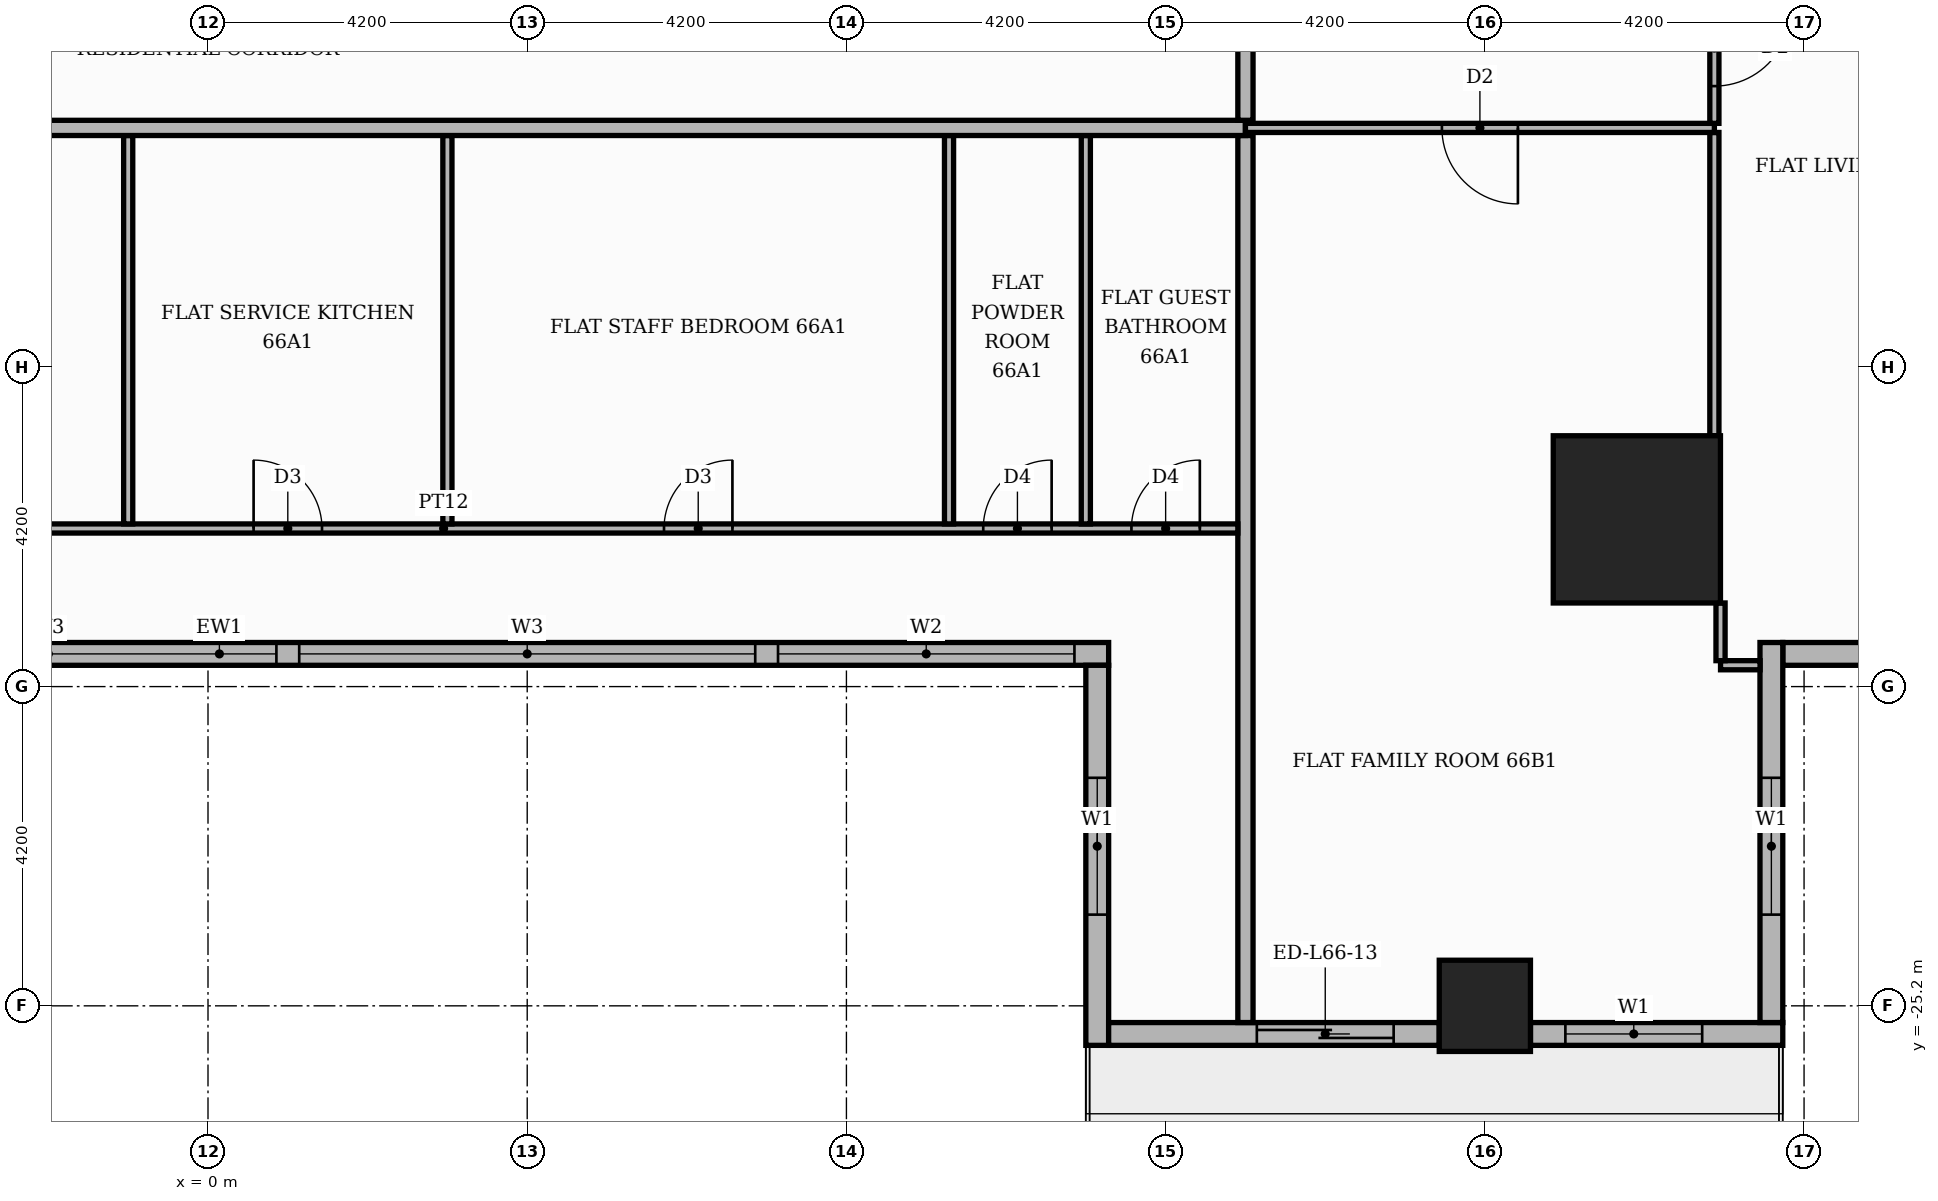
"""IFC4 building model, lengths in metres.
Left out: names, types, materials, properties, quantities, classifications, styles, units other than length and angle.
Written with IfcOpenShell. Run it as: python <this file> out.ifc"""

import sys

from ifc_helpers import new_model, si_unit, direction, frame, frame_2d, origin, origin_2d, place, context, subcontext, project, spatial, rectangle, extrude, element, fill, save


model = new_model("IFC4")
c1 = context("Model", 3, precision=1e-05, world=origin(), true_north=direction((0.0, 1.0)))
c2 = subcontext(c1, "Body", "Model", "MODEL_VIEW")
j1 = project(units=[si_unit("LENGTHUNIT", "METRE"), si_unit("PLANEANGLEUNIT", "RADIAN")], contexts=[c1])
p1 = place(None, origin())
s1 = spatial("IfcSite", under=j1, at=p1, CompositionType="ELEMENT")
p2 = place(p1, origin())
s2 = spatial("IfcBuilding", under=s1, at=p2, CompositionType="ELEMENT")
p3 = place(p2, frame((0.0, 0.0, 275.7)))
s3 = spatial("IfcBuildingStorey", under=s2, at=p3, CompositionType="ELEMENT", Elevation=275.7)
p4 = place(p3, frame((18.8, -18.8, 0.0), z_axis=(0.0, 0.0, 1.0), x_axis=(1.0, 0.0, 0.0)))
e1 = element("IfcColumn", 1, at=p4, inside=s3, PredefinedType="COLUMN", context=c2, shape_type="SweptSolid", body=[
    extrude(rectangle(XDim=2.2, YDim=2.2, at=origin_2d()), origin(), (0.0, 0.0, 1.0), 3.9),
])
p5 = place(p3, frame((16.8, -25.2, 0.0), z_axis=(0.0, 0.0, 1.0), x_axis=(1.0, 0.0, 0.0)))
e2 = element("IfcColumn", 2, at=p5, inside=s3, PredefinedType="COLUMN", context=c2, shape_type="SweptSolid", body=[
    extrude(rectangle(XDim=1.2, YDim=1.2, at=origin_2d()), origin(), (0.0, 0.0, 1.0), 3.9),
])
p6 = place(p3, frame((20.72, -20.57, 0.0), z_axis=(0.0, 0.0, 1.0), x_axis=(1.0, 0.0, 0.0)))
e3 = element("IfcWall", 3, at=p6, inside=s3, PredefinedType="STANDARD", context=c2, shape_type="SweptSolid", body=[
    extrude(rectangle(XDim=5.0, YDim=0.3, at=frame_2d((2.5, 0.0))), origin(), (0.0, 0.0, 1.0), 3.48),
])
p7 = place(p6, frame((1.48, 0.0, 0.9)))
e4 = element("IfcOpeningElement", 4, at=p7, cuts=e3, PredefinedType="OPENING", context=c2, shape_type="SweptSolid", body=[
    extrude(rectangle(XDim=1.8, YDim=2.1, at=frame_2d((0.9, 1.05))), frame((0.0, 0.16, 0.0), z_axis=(0.0, -1.0, 0.0), x_axis=(1.0, 0.0, 0.0)), (0.0, 0.0, 1.0), 0.32),
])
p8 = place(p3, frame((-11.55, -20.57, 0.0), z_axis=(0.0, 0.0, 1.0), x_axis=(1.0, 0.0, 0.0)))
e5 = element("IfcWall", 5, at=p8, inside=s3, PredefinedType="STANDARD", context=c2, shape_type="SweptSolid", body=[
    extrude(rectangle(XDim=23.4, YDim=0.3, at=frame_2d((11.7, 0.0))), origin(), (0.0, 0.0, 1.0), 3.48),
])
p9 = place(p8, frame((0.15, 0.0, 0.9)))
e6 = element("IfcOpeningElement", 6, at=p9, cuts=e5, PredefinedType="OPENING", context=c2, shape_type="SweptSolid", body=[
    extrude(rectangle(XDim=6.0, YDim=2.1, at=frame_2d((3.0, 1.05))), frame((0.0, 0.16, 0.0), z_axis=(0.0, -1.0, 0.0), x_axis=(1.0, 0.0, 0.0)), (0.0, 0.0, 1.0), 0.32),
])
p10 = place(p8, frame((6.45, 0.0, 0.9)))
e7 = element("IfcOpeningElement", 7, at=p10, cuts=e5, PredefinedType="OPENING", context=c2, shape_type="SweptSolid", body=[
    extrude(rectangle(XDim=6.0, YDim=2.1, at=frame_2d((3.0, 1.05))), frame((0.0, 0.16, 0.0), z_axis=(0.0, -1.0, 0.0), x_axis=(1.0, 0.0, 0.0)), (0.0, 0.0, 1.0), 0.32),
])
p11 = place(p8, frame((12.75, 0.0, 0.9)))
e8 = element("IfcOpeningElement", 8, at=p11, cuts=e5, PredefinedType="OPENING", context=c2, shape_type="SweptSolid", body=[
    extrude(rectangle(XDim=6.0, YDim=2.1, at=frame_2d((3.0, 1.05))), frame((0.0, 0.16, 0.0), z_axis=(0.0, -1.0, 0.0), x_axis=(1.0, 0.0, 0.0)), (0.0, 0.0, 1.0), 0.32),
])
p12 = place(p8, frame((19.05, 0.0, 0.9)))
e9 = element("IfcOpeningElement", 9, at=p12, cuts=e5, PredefinedType="OPENING", context=c2, shape_type="SweptSolid", body=[
    extrude(rectangle(XDim=3.9, YDim=2.1, at=frame_2d((1.95, 1.05))), frame((0.0, 0.16, 0.0), z_axis=(0.0, -1.0, 0.0), x_axis=(1.0, 0.0, 0.0)), (0.0, 0.0, 1.0), 0.32),
])
p13 = place(p3, frame((11.7, -20.72, 0.0), z_axis=(0.0, 0.0, 1.0), x_axis=(0.0, -1.0, 0.0)))
e10 = element("IfcWall", 10, at=p13, inside=s3, PredefinedType="STANDARD", context=c2, shape_type="SweptSolid", body=[
    extrude(rectangle(XDim=5.0, YDim=0.3, at=frame_2d((2.5, 0.0))), origin(), (0.0, 0.0, 1.0), 3.48),
])
p14 = place(p13, frame((1.48, 0.0, 0.9)))
e11 = element("IfcOpeningElement", 11, at=p14, cuts=e10, PredefinedType="OPENING", context=c2, shape_type="SweptSolid", body=[
    extrude(rectangle(XDim=1.8, YDim=2.1, at=frame_2d((0.9, 1.05))), frame((0.0, 0.16, 0.0), z_axis=(0.0, -1.0, 0.0), x_axis=(1.0, 0.0, 0.0)), (0.0, 0.0, 1.0), 0.32),
])
p15 = place(p3, frame((11.85, -25.57, 0.0), z_axis=(0.0, 0.0, 1.0), x_axis=(1.0, 0.0, 0.0)))
e12 = element("IfcWall", 12, at=p15, inside=s3, PredefinedType="STANDARD", context=c2, shape_type="SweptSolid", body=[
    extrude(rectangle(XDim=4.35, YDim=0.3, at=frame_2d((2.175, 0.0))), origin(), (0.0, 0.0, 1.0), 3.48),
])
p16 = place(p15, frame((1.95, 0.0, 0.0)))
e13 = element("IfcOpeningElement", 13, at=p16, cuts=e12, PredefinedType="OPENING", context=c2, shape_type="SweptSolid", body=[
    extrude(rectangle(XDim=1.8, YDim=2.4, at=frame_2d((0.9, 1.2))), frame((0.0, 0.16, 0.0), z_axis=(0.0, -1.0, 0.0), x_axis=(1.0, 0.0, 0.0)), (0.0, 0.0, 1.0), 0.32),
])
p17 = place(p3, frame((17.4, -25.57, 0.0), z_axis=(0.0, 0.0, 1.0), x_axis=(1.0, 0.0, 0.0)))
e14 = element("IfcWall", 14, at=p17, inside=s3, PredefinedType="STANDARD", context=c2, shape_type="SweptSolid", body=[
    extrude(rectangle(XDim=3.32, YDim=0.3, at=frame_2d((1.66, 0.0))), origin(), (0.0, 0.0, 1.0), 3.48),
])
p18 = place(p17, frame((0.459, 0.0, 0.9)))
e15 = element("IfcOpeningElement", 15, at=p18, cuts=e14, PredefinedType="OPENING", context=c2, shape_type="SweptSolid", body=[
    extrude(rectangle(XDim=1.8, YDim=2.1, at=frame_2d((0.9, 1.05))), frame((0.0, 0.16, 0.0), z_axis=(0.0, -1.0, 0.0), x_axis=(1.0, 0.0, 0.0)), (0.0, 0.0, 1.0), 0.32),
])
p19 = place(p3, frame((20.57, -25.42, 0.0), z_axis=(0.0, 0.0, 1.0), x_axis=(0.0, 1.0, 0.0)))
e16 = element("IfcWall", 16, at=p19, inside=s3, PredefinedType="STANDARD", context=c2, shape_type="SweptSolid", body=[
    extrude(rectangle(XDim=5.0, YDim=0.3, at=frame_2d((2.5, 0.0))), origin(), (0.0, 0.0, 1.0), 3.48),
])
p20 = place(p19, frame((1.42, 0.0, 0.9)))
e17 = element("IfcOpeningElement", 17, at=p20, cuts=e16, PredefinedType="OPENING", context=c2, shape_type="SweptSolid", body=[
    extrude(rectangle(XDim=1.8, YDim=2.1, at=frame_2d((0.9, 1.05))), frame((0.0, 0.16, 0.0), z_axis=(0.0, -1.0, 0.0), x_axis=(1.0, 0.0, 0.0)), (0.0, 0.0, 1.0), 0.32),
])
p21 = place(p3, frame((13.65, -25.42, 0.0), z_axis=(0.0, 0.0, 1.0), x_axis=(0.0, 1.0, 0.0)))
e18 = element("IfcWall", 18, at=p21, inside=s3, PredefinedType="PARTITIONING", context=c2, shape_type="SweptSolid", body=[
    extrude(rectangle(XDim=11.67, YDim=0.2, at=frame_2d((5.835, 0.0))), origin(), (0.0, 0.0, 1.0), 3.48),
])
p22 = place(p3, frame((19.901, -20.719, 0.0), z_axis=(0.0, 0.0, 1.0), x_axis=(1.0, 0.0, 0.0)))
e19 = element("IfcWall", 19, at=p22, inside=s3, PredefinedType="PARTITIONING", context=c2, shape_type="SweptSolid", body=[
    extrude(rectangle(XDim=0.52, YDim=0.12, at=frame_2d((0.26, 0.0))), origin(), (0.0, 0.0, 1.0), 3.48),
])
p23 = place(p3, frame((19.901, -20.659, 0.0), z_axis=(0.0, 0.0, 1.0), x_axis=(0.0, 1.0, 0.0)))
e20 = element("IfcWall", 20, at=p23, inside=s3, PredefinedType="PARTITIONING", context=c2, shape_type="SweptSolid", body=[
    extrude(rectangle(XDim=0.759, YDim=0.12, at=frame_2d((0.379, 0.0))), origin(), (0.0, 0.0, 1.0), 3.48),
])
p24 = place(p3, frame((-7.35, -18.92, 0.0), z_axis=(0.0, 0.0, 1.0), x_axis=(1.0, 0.0, 0.0)))
e21 = element("IfcWall", 21, at=p24, inside=s3, PredefinedType="PARTITIONING", context=c2, shape_type="SweptSolid", body=[
    extrude(rectangle(XDim=20.9, YDim=0.12, at=frame_2d((10.45, 0.0))), origin(), (0.0, 0.0, 1.0), 3.48),
])
p25 = place(p24, frame((2.7, 0.0, 0.0)))
e22 = element("IfcOpeningElement", 22, at=p25, cuts=e21, PredefinedType="OPENING", context=c2, shape_type="SweptSolid", body=[
    extrude(rectangle(XDim=0.9, YDim=2.1, at=frame_2d((0.45, 1.05))), frame((0.0, 0.07, 0.0), z_axis=(0.0, -1.0, 0.0), x_axis=(1.0, 0.0, 0.0)), (0.0, 0.0, 1.0), 0.14),
])
p26 = place(p24, frame((7.95, 0.0, 0.0)))
e23 = element("IfcOpeningElement", 23, at=p26, cuts=e21, PredefinedType="OPENING", context=c2, shape_type="SweptSolid", body=[
    extrude(rectangle(XDim=0.9, YDim=2.1, at=frame_2d((0.45, 1.05))), frame((0.0, 0.07, 0.0), z_axis=(0.0, -1.0, 0.0), x_axis=(1.0, 0.0, 0.0)), (0.0, 0.0, 1.0), 0.14),
])
p27 = place(p24, frame((13.35, 0.0, 0.0)))
e24 = element("IfcOpeningElement", 24, at=p27, cuts=e21, PredefinedType="OPENING", context=c2, shape_type="SweptSolid", body=[
    extrude(rectangle(XDim=0.9, YDim=2.1, at=frame_2d((0.45, 1.05))), frame((0.0, 0.07, 0.0), z_axis=(0.0, -1.0, 0.0), x_axis=(1.0, 0.0, 0.0)), (0.0, 0.0, 1.0), 0.14),
])
p28 = place(p24, frame((17.55, 0.0, 0.0)))
e25 = element("IfcOpeningElement", 25, at=p28, cuts=e21, PredefinedType="OPENING", context=c2, shape_type="SweptSolid", body=[
    extrude(rectangle(XDim=0.9, YDim=2.1, at=frame_2d((0.45, 1.05))), frame((0.0, 0.07, 0.0), z_axis=(0.0, -1.0, 0.0), x_axis=(1.0, 0.0, 0.0)), (0.0, 0.0, 1.0), 0.14),
])
p29 = place(p24, frame((19.5, 0.0, 0.0)))
e26 = element("IfcOpeningElement", 26, at=p29, cuts=e21, PredefinedType="OPENING", context=c2, shape_type="SweptSolid", body=[
    extrude(rectangle(XDim=0.9, YDim=2.1, at=frame_2d((0.45, 1.05))), frame((0.0, 0.07, 0.0), z_axis=(0.0, -1.0, 0.0), x_axis=(1.0, 0.0, 0.0)), (0.0, 0.0, 1.0), 0.14),
])
for number, where, z_axis, x_axis in (
    (27, (-1.05, -18.86, 0.0), (0.0, 0.0, 1.0), (0.0, 1.0, 0.0)),
    (28, (3.15, -18.86, 0.0), (0.0, 0.0, 1.0), (0.0, 1.0, 0.0)),
    (29, (9.75, -18.86, 0.0), (0.0, 0.0, 1.0), (0.0, 1.0, 0.0)),
    (30, (11.55, -18.86, 0.0), (0.0, 0.0, 1.0), (0.0, 1.0, 0.0)),
):
    element("IfcWall", number, at=place(p3, frame(where, z_axis=z_axis, x_axis=x_axis)), inside=s3, PredefinedType="PARTITIONING", context=c2, shape_type="SweptSolid", body=[
        extrude(rectangle(XDim=5.11, YDim=0.12, at=frame_2d((2.555, 0.0))), origin(), (0.0, 0.0, 1.0), 3.48),
    ])
p30 = place(p3, frame((19.82, -17.7, 0.0), z_axis=(0.0, 0.0, 1.0), x_axis=(0.0, 1.0, 0.0)))
e31 = element("IfcWall", 31, at=p30, inside=s3, PredefinedType="PARTITIONING", context=c2, shape_type="SweptSolid", body=[
    extrude(rectangle(XDim=3.99, YDim=0.12, at=frame_2d((1.995, 0.0))), origin(), (0.0, 0.0, 1.0), 3.48),
])
p31 = place(p3, frame((-25.42, -13.65, 0.0), z_axis=(0.0, 0.0, 1.0), x_axis=(1.0, 0.0, 0.0)))
e32 = element("IfcWall", 32, at=p31, inside=s3, PredefinedType="PARTITIONING", context=c2, shape_type="SweptSolid", body=[
    extrude(rectangle(XDim=39.07, YDim=0.2, at=frame_2d((19.535, 0.0))), origin(), (0.0, 0.0, 1.0), 3.48),
])
p32 = place(p31, frame((14.37, 0.0, 0.0)))
e33 = element("IfcOpeningElement", 33, at=p32, cuts=e32, PredefinedType="OPENING", context=c2, shape_type="SweptSolid", body=[
    extrude(rectangle(XDim=1.1, YDim=2.4, at=frame_2d((0.55, 1.2))), frame((0.0, 0.11, 0.0), z_axis=(0.0, -1.0, 0.0), x_axis=(1.0, 0.0, 0.0)), (0.0, 0.0, 1.0), 0.22),
])
p33 = place(p3, frame((13.65, -13.65, 0.0), z_axis=(0.0, 0.0, 1.0), x_axis=(1.0, 0.0, 0.0)))
e34 = element("IfcWall", 34, at=p33, inside=s3, PredefinedType="PARTITIONING", context=c2, shape_type="SweptSolid", body=[
    extrude(rectangle(XDim=6.17, YDim=0.12, at=frame_2d((3.085, 0.0))), origin(), (0.0, 0.0, 1.0), 3.48),
])
p34 = place(p33, frame((2.585, 0.0, 0.0)))
e35 = element("IfcOpeningElement", 35, at=p34, cuts=e34, PredefinedType="OPENING", context=c2, shape_type="SweptSolid", body=[
    extrude(rectangle(XDim=1.0, YDim=2.1, at=frame_2d((0.5, 1.05))), frame((0.0, 0.07, 0.0), z_axis=(0.0, -1.0, 0.0), x_axis=(1.0, 0.0, 0.0)), (0.0, 0.0, 1.0), 0.14),
])
p35 = place(p3, frame((19.82, -13.59, 0.0), z_axis=(0.0, 0.0, 1.0), x_axis=(0.0, 1.0, 0.0)))
e36 = element("IfcWall", 36, at=p35, inside=s3, PredefinedType="PARTITIONING", context=c2, shape_type="SweptSolid", body=[
    extrude(rectangle(XDim=1.98, YDim=0.12, at=frame_2d((0.99, 0.0))), origin(), (0.0, 0.0, 1.0), 3.48),
])
p36 = place(p35, frame((0.49, 0.0, 0.0)))
e37 = element("IfcOpeningElement", 37, at=p36, cuts=e36, PredefinedType="OPENING", context=c2, shape_type="SweptSolid", body=[
    extrude(rectangle(XDim=1.0, YDim=2.1, at=frame_2d((0.5, 1.05))), frame((0.0, 0.07, 0.0), z_axis=(0.0, -1.0, 0.0), x_axis=(1.0, 0.0, 0.0)), (0.0, 0.0, 1.0), 0.14),
])
p37 = place(p3, frame((13.65, -13.55, 0.0), z_axis=(0.0, 0.0, 1.0), x_axis=(0.0, 1.0, 0.0)))
e38 = element("IfcWall", 38, at=p37, inside=s3, PredefinedType="PARTITIONING", context=c2, shape_type="SweptSolid", body=[
    extrude(rectangle(XDim=2.45, YDim=0.2, at=frame_2d((1.225, 0.0))), origin(), (0.0, 0.0, 1.0), 3.48),
])
p38 = place(p10, origin())
e39 = element("IfcWindow", 39, at=p38, inside=s3, PartitioningType="SINGLE_PANEL", PredefinedType="WINDOW", context=c2, shape_type="SweptSolid", body=[
    extrude(rectangle(XDim=6.0, YDim=2.1, at=frame_2d((3.0, 1.05))), frame((0.0, 0.03, 0.0), z_axis=(0.0, -1.0, 0.0), x_axis=(1.0, 0.0, 0.0)), (0.0, 0.0, 1.0), 0.06),
])
fill(e7, e39)
p39 = place(p11, origin())
e40 = element("IfcWindow", 40, at=p39, inside=s3, PartitioningType="SINGLE_PANEL", PredefinedType="WINDOW", context=c2, shape_type="SweptSolid", body=[
    extrude(rectangle(XDim=6.0, YDim=2.1, at=frame_2d((3.0, 1.05))), frame((0.0, 0.03, 0.0), z_axis=(0.0, -1.0, 0.0), x_axis=(1.0, 0.0, 0.0)), (0.0, 0.0, 1.0), 0.06),
])
fill(e8, e40)
p40 = place(p12, origin())
e41 = element("IfcWindow", 41, at=p40, inside=s3, PartitioningType="SINGLE_PANEL", PredefinedType="WINDOW", context=c2, shape_type="SweptSolid", body=[
    extrude(rectangle(XDim=3.9, YDim=2.1, at=frame_2d((1.95, 1.05))), frame((0.0, 0.03, 0.0), z_axis=(0.0, -1.0, 0.0), x_axis=(1.0, 0.0, 0.0)), (0.0, 0.0, 1.0), 0.06),
])
fill(e9, e41)
p41 = place(p14, origin())
e42 = element("IfcWindow", 42, at=p41, inside=s3, PartitioningType="SINGLE_PANEL", PredefinedType="WINDOW", context=c2, shape_type="SweptSolid", body=[
    extrude(rectangle(XDim=1.8, YDim=2.1, at=frame_2d((0.9, 1.05))), frame((0.0, 0.03, 0.0), z_axis=(0.0, -1.0, 0.0), x_axis=(1.0, 0.0, 0.0)), (0.0, 0.0, 1.0), 0.06),
])
fill(e11, e42)
p42 = place(p16, origin())
e43 = element("IfcDoor", 43, at=p42, inside=s3, OperationType="SLIDING_TO_RIGHT", PredefinedType="DOOR", context=c2, shape_type="SweptSolid", body=[
    extrude(rectangle(XDim=1.8, YDim=2.4, at=frame_2d((0.9, 1.2))), frame((0.0, 0.025, 0.0), z_axis=(0.0, -1.0, 0.0), x_axis=(1.0, 0.0, 0.0)), (0.0, 0.0, 1.0), 0.05),
])
fill(e13, e43)
p43 = place(p18, origin())
e44 = element("IfcWindow", 44, at=p43, inside=s3, PartitioningType="SINGLE_PANEL", PredefinedType="WINDOW", context=c2, shape_type="SweptSolid", body=[
    extrude(rectangle(XDim=1.8, YDim=2.1, at=frame_2d((0.9, 1.05))), frame((0.0, 0.03, 0.0), z_axis=(0.0, -1.0, 0.0), x_axis=(1.0, 0.0, 0.0)), (0.0, 0.0, 1.0), 0.06),
])
fill(e15, e44)
p44 = place(p20, origin())
e45 = element("IfcWindow", 45, at=p44, inside=s3, PartitioningType="SINGLE_PANEL", PredefinedType="WINDOW", context=c2, shape_type="SweptSolid", body=[
    extrude(rectangle(XDim=1.8, YDim=2.1, at=frame_2d((0.9, 1.05))), frame((0.0, 0.03, 0.0), z_axis=(0.0, -1.0, 0.0), x_axis=(1.0, 0.0, 0.0)), (0.0, 0.0, 1.0), 0.06),
])
fill(e17, e45)
p45 = place(p26, origin())
e46 = element("IfcDoor", 46, at=p45, inside=s3, OperationType="SINGLE_SWING_LEFT", PredefinedType="DOOR", context=c2, shape_type="SweptSolid", body=[
    extrude(rectangle(XDim=0.9, YDim=2.1, at=frame_2d((0.45, 1.05))), frame((0.0, 0.025, 0.0), z_axis=(0.0, -1.0, 0.0), x_axis=(1.0, 0.0, 0.0)), (0.0, 0.0, 1.0), 0.05),
])
fill(e23, e46)
p46 = place(p27, origin())
e47 = element("IfcDoor", 47, at=p46, inside=s3, OperationType="SINGLE_SWING_RIGHT", PredefinedType="DOOR", context=c2, shape_type="SweptSolid", body=[
    extrude(rectangle(XDim=0.9, YDim=2.1, at=frame_2d((0.45, 1.05))), frame((0.0, 0.025, 0.0), z_axis=(0.0, -1.0, 0.0), x_axis=(1.0, 0.0, 0.0)), (0.0, 0.0, 1.0), 0.05),
])
fill(e24, e47)
p47 = place(p28, origin())
e48 = element("IfcDoor", 48, at=p47, inside=s3, OperationType="SINGLE_SWING_RIGHT", PredefinedType="DOOR", context=c2, shape_type="SweptSolid", body=[
    extrude(rectangle(XDim=0.9, YDim=2.1, at=frame_2d((0.45, 1.05))), frame((0.0, 0.025, 0.0), z_axis=(0.0, -1.0, 0.0), x_axis=(1.0, 0.0, 0.0)), (0.0, 0.0, 1.0), 0.05),
])
fill(e25, e48)
p48 = place(p29, origin())
e49 = element("IfcDoor", 49, at=p48, inside=s3, OperationType="SINGLE_SWING_RIGHT", PredefinedType="DOOR", context=c2, shape_type="SweptSolid", body=[
    extrude(rectangle(XDim=0.9, YDim=2.1, at=frame_2d((0.45, 1.05))), frame((0.0, 0.025, 0.0), z_axis=(0.0, -1.0, 0.0), x_axis=(1.0, 0.0, 0.0)), (0.0, 0.0, 1.0), 0.05),
])
fill(e26, e49)
p49 = place(p34, frame((1.0, 0.0, 0.0), z_axis=(0.0, 0.0, 1.0), x_axis=(-1.0, 0.0, 0.0)))
e50 = element("IfcDoor", 50, at=p49, inside=s3, OperationType="SINGLE_SWING_RIGHT", PredefinedType="DOOR", context=c2, shape_type="SweptSolid", body=[
    extrude(rectangle(XDim=1.0, YDim=2.1, at=frame_2d((0.5, 1.05))), frame((0.0, 0.025, 0.0), z_axis=(0.0, -1.0, 0.0), x_axis=(1.0, 0.0, 0.0)), (0.0, 0.0, 1.0), 0.05),
])
fill(e35, e50)
p50 = place(p36, frame((1.0, 0.0, 0.0), z_axis=(0.0, 0.0, 1.0), x_axis=(-1.0, 0.0, 0.0)))
e51 = element("IfcDoor", 51, at=p50, inside=s3, OperationType="SINGLE_SWING_RIGHT", PredefinedType="DOOR", context=c2, shape_type="SweptSolid", body=[
    extrude(rectangle(XDim=1.0, YDim=2.1, at=frame_2d((0.5, 1.05))), frame((0.0, 0.025, 0.0), z_axis=(0.0, -1.0, 0.0), x_axis=(1.0, 0.0, 0.0)), (0.0, 0.0, 1.0), 0.05),
])
fill(e37, e51)
save(model, sys.argv[1])
